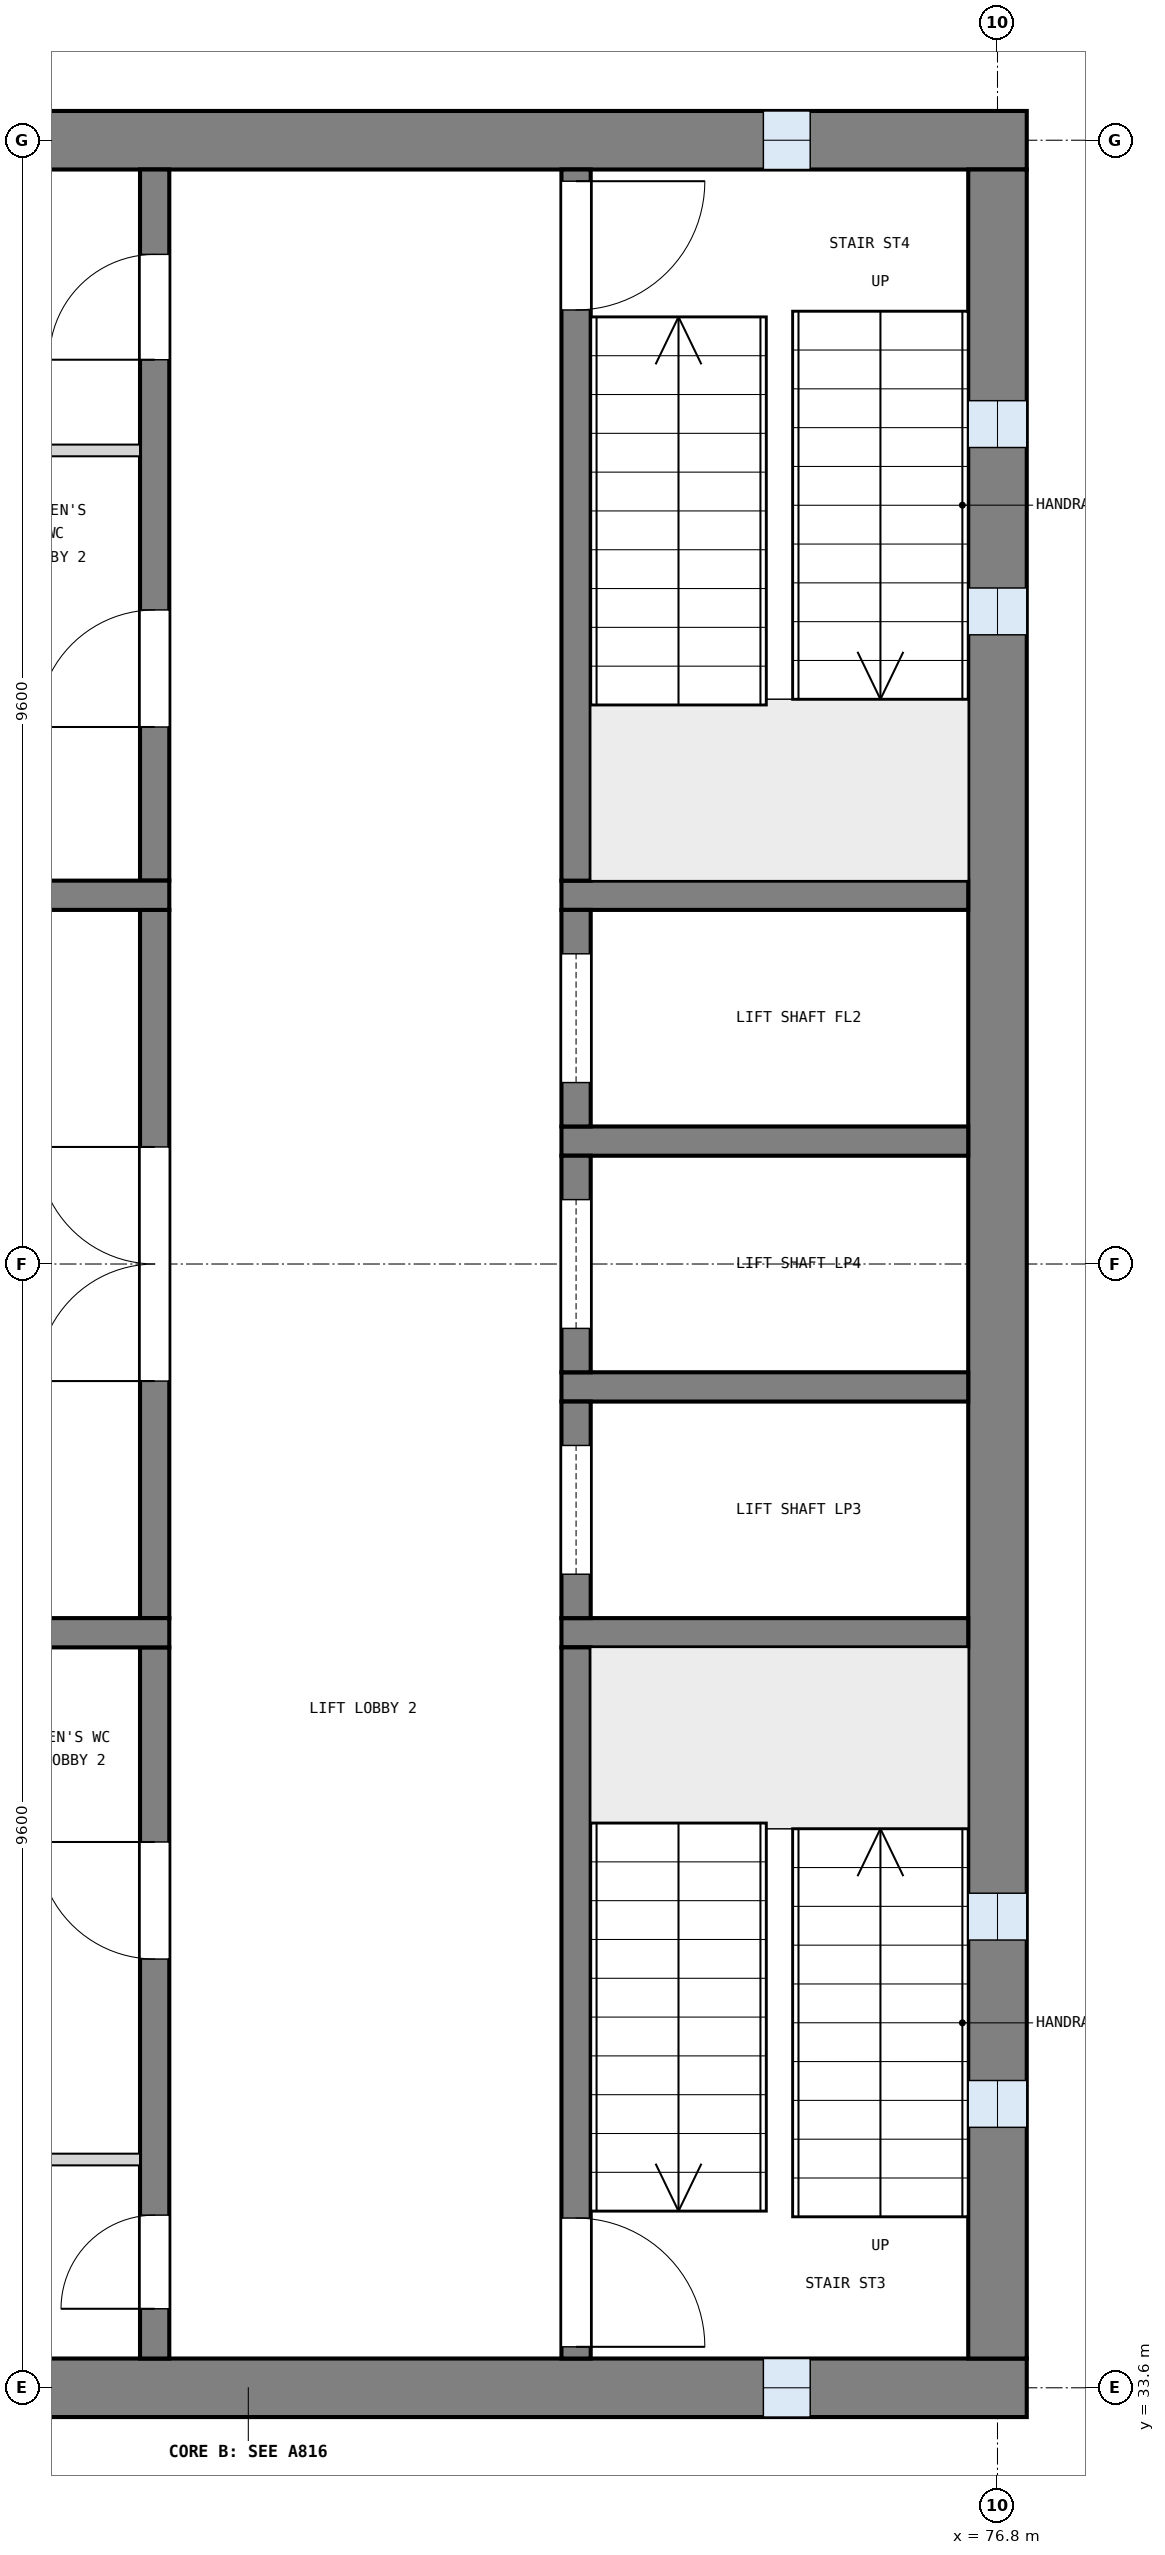
"""IFC4 building model, lengths in metres.
Left out: names, types, materials, properties, quantities, classifications, styles, units other than length and angle.
Written with IfcOpenShell. Run it as: python <this file> out.ifc"""

import sys

from ifc_helpers import new_model, si_unit, direction, frame, frame_2d, origin, place, context, subcontext, project, spatial, rectangle, extrude, element, fill, save


model = new_model("IFC4")
c1 = context("Model", 3, precision=1e-05, world=origin(), true_north=direction((0.0, 1.0)))
c2 = subcontext(c1, "Body", "Model", "MODEL_VIEW")
j1 = project(units=[si_unit("LENGTHUNIT", "METRE"), si_unit("PLANEANGLEUNIT", "RADIAN")], contexts=[c1])
p1 = place(None, origin())
s1 = spatial("IfcSite", under=j1, at=p1, CompositionType="ELEMENT")
p2 = place(p1, origin())
s2 = spatial("IfcBuilding", under=s1, at=p2, CompositionType="ELEMENT")
p3 = place(p2, frame((0.0, 0.0, 56.1)))
s3 = spatial("IfcBuildingStorey", under=s2, at=p3, CompositionType="ELEMENT", Elevation=56.1)
p4 = place(p3, frame((63.75, 52.8, 0.0), z_axis=(0.0, 0.0, 1.0), x_axis=(1.0, 0.0, 0.0)))
e1 = element("IfcWall", 1, at=p4, inside=s3, PredefinedType="SHEAR", context=c2, shape_type="SweptSolid", body=[
    extrude(rectangle(XDim=13.3, YDim=0.5, at=frame_2d((6.65, 0.0))), origin(), (0.0, 0.0, 1.0), 3.9),
])
p5 = place(p4, frame((11.05, 0.0, 1.0)))
e2 = element("IfcOpeningElement", 2, at=p5, cuts=e1, PredefinedType="OPENING", context=c2, shape_type="SweptSolid", body=[
    extrude(rectangle(XDim=0.4, YDim=2.0, at=frame_2d((0.2, 1.0))), frame((0.0, 0.26, 0.0), z_axis=(0.0, -1.0, 0.0), x_axis=(1.0, 0.0, 0.0)), (0.0, 0.0, 1.0), 0.52),
])
p6 = place(p3, frame((63.75, 33.6, 0.0), z_axis=(0.0, 0.0, 1.0), x_axis=(1.0, 0.0, 0.0)))
e3 = element("IfcWall", 3, at=p6, inside=s3, PredefinedType="SHEAR", context=c2, shape_type="SweptSolid", body=[
    extrude(rectangle(XDim=13.3, YDim=0.5, at=frame_2d((6.65, 0.0))), origin(), (0.0, 0.0, 1.0), 3.9),
])
p7 = place(p6, frame((11.05, 0.0, 1.0)))
e4 = element("IfcOpeningElement", 4, at=p7, cuts=e3, PredefinedType="OPENING", context=c2, shape_type="SweptSolid", body=[
    extrude(rectangle(XDim=0.4, YDim=2.0, at=frame_2d((0.2, 1.0))), frame((0.0, 0.26, 0.0), z_axis=(0.0, -1.0, 0.0), x_axis=(1.0, 0.0, 0.0)), (0.0, 0.0, 1.0), 0.52),
])
p8 = place(p3, frame((76.8, 33.85, 0.0), z_axis=(0.0, 0.0, 1.0), x_axis=(0.0, 1.0, 0.0)))
e5 = element("IfcWall", 5, at=p8, inside=s3, PredefinedType="SHEAR", context=c2, shape_type="SweptSolid", body=[
    extrude(rectangle(XDim=18.7, YDim=0.5, at=frame_2d((9.35, 0.0))), origin(), (0.0, 0.0, 1.0), 3.9),
])
p9 = place(p8, frame((1.975, 0.0, 1.0)))
e6 = element("IfcOpeningElement", 6, at=p9, cuts=e5, PredefinedType="OPENING", context=c2, shape_type="SweptSolid", body=[
    extrude(rectangle(XDim=0.4, YDim=2.0, at=frame_2d((0.2, 1.0))), frame((0.0, 0.26, 0.0), z_axis=(0.0, -1.0, 0.0), x_axis=(1.0, 0.0, 0.0)), (0.0, 0.0, 1.0), 0.52),
])
p10 = place(p8, frame((3.575, 0.0, 1.0)))
e7 = element("IfcOpeningElement", 7, at=p10, cuts=e5, PredefinedType="OPENING", context=c2, shape_type="SweptSolid", body=[
    extrude(rectangle(XDim=0.4, YDim=2.0, at=frame_2d((0.2, 1.0))), frame((0.0, 0.26, 0.0), z_axis=(0.0, -1.0, 0.0), x_axis=(1.0, 0.0, 0.0)), (0.0, 0.0, 1.0), 0.52),
])
p11 = place(p8, frame((14.725, 0.0, 1.0)))
e8 = element("IfcOpeningElement", 8, at=p11, cuts=e5, PredefinedType="OPENING", context=c2, shape_type="SweptSolid", body=[
    extrude(rectangle(XDim=0.4, YDim=2.0, at=frame_2d((0.2, 1.0))), frame((0.0, 0.26, 0.0), z_axis=(0.0, -1.0, 0.0), x_axis=(1.0, 0.0, 0.0)), (0.0, 0.0, 1.0), 0.52),
])
p12 = place(p8, frame((16.325, 0.0, 1.0)))
e9 = element("IfcOpeningElement", 9, at=p12, cuts=e5, PredefinedType="OPENING", context=c2, shape_type="SweptSolid", body=[
    extrude(rectangle(XDim=0.4, YDim=2.0, at=frame_2d((0.2, 1.0))), frame((0.0, 0.26, 0.0), z_axis=(0.0, -1.0, 0.0), x_axis=(1.0, 0.0, 0.0)), (0.0, 0.0, 1.0), 0.52),
])
for number, where, z_axis, x_axis in (
    (10, (76.55, 40.05, 0.0), (0.0, 0.0, 1.0), (-1.0, 0.0, 0.0)),
    (11, (76.55, 42.15, 0.0), (0.0, 0.0, 1.0), (-1.0, 0.0, 0.0)),
    (12, (76.55, 44.25, 0.0), (0.0, 0.0, 1.0), (-1.0, 0.0, 0.0)),
    (13, (76.55, 46.35, 0.0), (0.0, 0.0, 1.0), (-1.0, 0.0, 0.0)),
):
    element("IfcWall", number, at=place(p3, frame(where, z_axis=z_axis, x_axis=x_axis)), inside=s3, PredefinedType="SOLIDWALL", context=c2, shape_type="SweptSolid", body=[
        extrude(rectangle(XDim=3.475, YDim=0.25, at=frame_2d((1.738, 0.0))), origin(), (0.0, 0.0, 1.0), 3.6),
    ])
p13 = place(p3, frame((73.2, 33.85, 0.0), z_axis=(0.0, 0.0, 1.0), x_axis=(0.0, 1.0, 0.0)))
e14 = element("IfcWall", 14, at=p13, inside=s3, PredefinedType="SOLIDWALL", context=c2, shape_type="SweptSolid", body=[
    extrude(rectangle(XDim=6.075, YDim=0.25, at=frame_2d((3.038, 0.0))), origin(), (0.0, 0.0, 1.0), 3.6),
])
p14 = place(p13, frame((0.1, 0.0, 0.0)))
e15 = element("IfcOpeningElement", 15, at=p14, cuts=e14, PredefinedType="OPENING", context=c2, shape_type="SweptSolid", body=[
    extrude(rectangle(XDim=1.1, YDim=2.1, at=frame_2d((0.55, 1.05))), frame((0.0, 0.135, 0.0), z_axis=(0.0, -1.0, 0.0), x_axis=(1.0, 0.0, 0.0)), (0.0, 0.0, 1.0), 0.27),
])
p15 = place(p3, frame((73.2, 40.175, 0.0), z_axis=(0.0, 0.0, 1.0), x_axis=(0.0, 1.0, 0.0)))
e16 = element("IfcWall", 16, at=p15, inside=s3, PredefinedType="SOLIDWALL", context=c2, shape_type="SweptSolid", body=[
    extrude(rectangle(XDim=1.85, YDim=0.25, at=frame_2d((0.925, 0.0))), origin(), (0.0, 0.0, 1.0), 3.6),
])
p16 = place(p15, frame((0.375, 0.0, 0.0)))
e17 = element("IfcOpeningElement", 17, at=p16, cuts=e16, PredefinedType="OPENING", context=c2, shape_type="SweptSolid", body=[
    extrude(rectangle(XDim=1.1, YDim=2.1, at=frame_2d((0.55, 1.05))), frame((0.0, 0.135, 0.0), z_axis=(0.0, -1.0, 0.0), x_axis=(1.0, 0.0, 0.0)), (0.0, 0.0, 1.0), 0.27),
])
p17 = place(p3, frame((73.2, 42.275, 0.0), z_axis=(0.0, 0.0, 1.0), x_axis=(0.0, 1.0, 0.0)))
e18 = element("IfcWall", 18, at=p17, inside=s3, PredefinedType="SOLIDWALL", context=c2, shape_type="SweptSolid", body=[
    extrude(rectangle(XDim=1.85, YDim=0.25, at=frame_2d((0.925, 0.0))), origin(), (0.0, 0.0, 1.0), 3.6),
])
p18 = place(p17, frame((0.375, 0.0, 0.0)))
e19 = element("IfcOpeningElement", 19, at=p18, cuts=e18, PredefinedType="OPENING", context=c2, shape_type="SweptSolid", body=[
    extrude(rectangle(XDim=1.1, YDim=2.1, at=frame_2d((0.55, 1.05))), frame((0.0, 0.135, 0.0), z_axis=(0.0, -1.0, 0.0), x_axis=(1.0, 0.0, 0.0)), (0.0, 0.0, 1.0), 0.27),
])
p19 = place(p3, frame((73.2, 44.375, 0.0), z_axis=(0.0, 0.0, 1.0), x_axis=(0.0, 1.0, 0.0)))
e20 = element("IfcWall", 20, at=p19, inside=s3, PredefinedType="SOLIDWALL", context=c2, shape_type="SweptSolid", body=[
    extrude(rectangle(XDim=1.85, YDim=0.25, at=frame_2d((0.925, 0.0))), origin(), (0.0, 0.0, 1.0), 3.6),
])
p20 = place(p19, frame((0.375, 0.0, 0.0)))
e21 = element("IfcOpeningElement", 21, at=p20, cuts=e20, PredefinedType="OPENING", context=c2, shape_type="SweptSolid", body=[
    extrude(rectangle(XDim=1.1, YDim=2.1, at=frame_2d((0.55, 1.05))), frame((0.0, 0.135, 0.0), z_axis=(0.0, -1.0, 0.0), x_axis=(1.0, 0.0, 0.0)), (0.0, 0.0, 1.0), 0.27),
])
p21 = place(p3, frame((73.2, 46.475, 0.0), z_axis=(0.0, 0.0, 1.0), x_axis=(0.0, 1.0, 0.0)))
e22 = element("IfcWall", 22, at=p21, inside=s3, PredefinedType="SOLIDWALL", context=c2, shape_type="SweptSolid", body=[
    extrude(rectangle(XDim=6.075, YDim=0.25, at=frame_2d((3.038, 0.0))), origin(), (0.0, 0.0, 1.0), 3.6),
])
p22 = place(p21, frame((4.875, 0.0, 0.0)))
e23 = element("IfcOpeningElement", 23, at=p22, cuts=e22, PredefinedType="OPENING", context=c2, shape_type="SweptSolid", body=[
    extrude(rectangle(XDim=1.1, YDim=2.1, at=frame_2d((0.55, 1.05))), frame((0.0, 0.135, 0.0), z_axis=(0.0, -1.0, 0.0), x_axis=(1.0, 0.0, 0.0)), (0.0, 0.0, 1.0), 0.27),
])
p23 = place(p3, frame((69.6, 33.85, 0.0), z_axis=(0.0, 0.0, 1.0), x_axis=(0.0, 1.0, 0.0)))
e24 = element("IfcWall", 24, at=p23, inside=s3, PredefinedType="SOLIDWALL", context=c2, shape_type="SweptSolid", body=[
    extrude(rectangle(XDim=6.075, YDim=0.25, at=frame_2d((3.038, 0.0))), origin(), (0.0, 0.0, 1.0), 3.6),
])
p24 = place(p23, frame((0.425, 0.0, 0.0)))
e25 = element("IfcOpeningElement", 25, at=p24, cuts=e24, PredefinedType="OPENING", context=c2, shape_type="SweptSolid", body=[
    extrude(rectangle(XDim=0.8, YDim=2.1, at=frame_2d((0.4, 1.05))), frame((0.0, 0.135, 0.0), z_axis=(0.0, -1.0, 0.0), x_axis=(1.0, 0.0, 0.0)), (0.0, 0.0, 1.0), 0.27),
])
p25 = place(p23, frame((3.413, 0.0, 0.0)))
e26 = element("IfcOpeningElement", 26, at=p25, cuts=e24, PredefinedType="OPENING", context=c2, shape_type="SweptSolid", body=[
    extrude(rectangle(XDim=1.0, YDim=2.1, at=frame_2d((0.5, 1.05))), frame((0.0, 0.135, 0.0), z_axis=(0.0, -1.0, 0.0), x_axis=(1.0, 0.0, 0.0)), (0.0, 0.0, 1.0), 0.27),
])
p26 = place(p3, frame((69.6, 40.175, 0.0), z_axis=(0.0, 0.0, 1.0), x_axis=(0.0, 1.0, 0.0)))
e27 = element("IfcWall", 27, at=p26, inside=s3, PredefinedType="SOLIDWALL", context=c2, shape_type="SweptSolid", body=[
    extrude(rectangle(XDim=6.05, YDim=0.25, at=frame_2d((3.025, 0.0))), origin(), (0.0, 0.0, 1.0), 3.6),
])
p27 = place(p26, frame((2.025, 0.0, 0.0)))
e28 = element("IfcOpeningElement", 28, at=p27, cuts=e27, PredefinedType="OPENING", context=c2, shape_type="SweptSolid", body=[
    extrude(rectangle(XDim=2.0, YDim=2.1, at=frame_2d((1.0, 1.05))), frame((0.0, 0.135, 0.0), z_axis=(0.0, -1.0, 0.0), x_axis=(1.0, 0.0, 0.0)), (0.0, 0.0, 1.0), 0.27),
])
p28 = place(p3, frame((69.6, 46.475, 0.0), z_axis=(0.0, 0.0, 1.0), x_axis=(0.0, 1.0, 0.0)))
e29 = element("IfcWall", 29, at=p28, inside=s3, PredefinedType="SOLIDWALL", context=c2, shape_type="SweptSolid", body=[
    extrude(rectangle(XDim=6.075, YDim=0.25, at=frame_2d((3.038, 0.0))), origin(), (0.0, 0.0, 1.0), 3.6),
])
p29 = place(p28, frame((1.312, 0.0, 0.0)))
e30 = element("IfcOpeningElement", 30, at=p29, cuts=e29, PredefinedType="OPENING", context=c2, shape_type="SweptSolid", body=[
    extrude(rectangle(XDim=1.0, YDim=2.1, at=frame_2d((0.5, 1.05))), frame((0.0, 0.135, 0.0), z_axis=(0.0, -1.0, 0.0), x_axis=(1.0, 0.0, 0.0)), (0.0, 0.0, 1.0), 0.27),
])
p30 = place(p28, frame((4.45, 0.0, 0.0)))
e31 = element("IfcOpeningElement", 31, at=p30, cuts=e29, PredefinedType="OPENING", context=c2, shape_type="SweptSolid", body=[
    extrude(rectangle(XDim=0.9, YDim=2.1, at=frame_2d((0.45, 1.05))), frame((0.0, 0.135, 0.0), z_axis=(0.0, -1.0, 0.0), x_axis=(1.0, 0.0, 0.0)), (0.0, 0.0, 1.0), 0.27),
])
for number, where, z_axis, x_axis in (
    (32, (69.725, 40.05, 0.0), (0.0, 0.0, 1.0), (-1.0, 0.0, 0.0)),
    (33, (69.725, 46.35, 0.0), (0.0, 0.0, 1.0), (-1.0, 0.0, 0.0)),
):
    element("IfcWall", number, at=place(p3, frame(where, z_axis=z_axis, x_axis=x_axis)), inside=s3, PredefinedType="SOLIDWALL", context=c2, shape_type="SweptSolid", body=[
        extrude(rectangle(XDim=5.475, YDim=0.25, at=frame_2d((2.738, 0.0))), origin(), (0.0, 0.0, 1.0), 3.6),
    ])
for number, where, z_axis, x_axis in (
    (34, (69.475, 35.55, 0.0), (0.0, 0.0, 1.0), (-1.0, 0.0, 0.0)),
    (35, (69.475, 50.15, 0.0), (0.0, 0.0, 1.0), (-1.0, 0.0, 0.0)),
):
    element("IfcWall", number, at=place(p3, frame(where, z_axis=z_axis, x_axis=x_axis)), inside=s3, PredefinedType="PARTITIONING", context=c2, shape_type="SweptSolid", body=[
        extrude(rectangle(XDim=5.225, YDim=0.1, at=frame_2d((2.613, 0.0))), origin(), (0.0, 0.0, 1.0), 3.6),
    ])
p31 = place(p9, origin())
e36 = element("IfcWindow", 36, at=p31, inside=s3, PartitioningType="SINGLE_PANEL", PredefinedType="WINDOW", context=c2, shape_type="SweptSolid", body=[
    extrude(rectangle(XDim=0.4, YDim=2.0, at=frame_2d((0.2, 1.0))), frame((0.0, 0.03, 0.0), z_axis=(0.0, -1.0, 0.0), x_axis=(1.0, 0.0, 0.0)), (0.0, 0.0, 1.0), 0.06),
])
fill(e6, e36)
p32 = place(p10, origin())
e37 = element("IfcWindow", 37, at=p32, inside=s3, PartitioningType="SINGLE_PANEL", PredefinedType="WINDOW", context=c2, shape_type="SweptSolid", body=[
    extrude(rectangle(XDim=0.4, YDim=2.0, at=frame_2d((0.2, 1.0))), frame((0.0, 0.03, 0.0), z_axis=(0.0, -1.0, 0.0), x_axis=(1.0, 0.0, 0.0)), (0.0, 0.0, 1.0), 0.06),
])
fill(e7, e37)
p33 = place(p11, origin())
e38 = element("IfcWindow", 38, at=p33, inside=s3, PartitioningType="SINGLE_PANEL", PredefinedType="WINDOW", context=c2, shape_type="SweptSolid", body=[
    extrude(rectangle(XDim=0.4, YDim=2.0, at=frame_2d((0.2, 1.0))), frame((0.0, 0.03, 0.0), z_axis=(0.0, -1.0, 0.0), x_axis=(1.0, 0.0, 0.0)), (0.0, 0.0, 1.0), 0.06),
])
fill(e8, e38)
p34 = place(p12, origin())
e39 = element("IfcWindow", 39, at=p34, inside=s3, PartitioningType="SINGLE_PANEL", PredefinedType="WINDOW", context=c2, shape_type="SweptSolid", body=[
    extrude(rectangle(XDim=0.4, YDim=2.0, at=frame_2d((0.2, 1.0))), frame((0.0, 0.03, 0.0), z_axis=(0.0, -1.0, 0.0), x_axis=(1.0, 0.0, 0.0)), (0.0, 0.0, 1.0), 0.06),
])
fill(e9, e39)
p35 = place(p7, origin())
e40 = element("IfcWindow", 40, at=p35, inside=s3, PartitioningType="SINGLE_PANEL", PredefinedType="WINDOW", context=c2, shape_type="SweptSolid", body=[
    extrude(rectangle(XDim=0.4, YDim=2.0, at=frame_2d((0.2, 1.0))), frame((0.0, 0.03, 0.0), z_axis=(0.0, -1.0, 0.0), x_axis=(1.0, 0.0, 0.0)), (0.0, 0.0, 1.0), 0.06),
])
fill(e4, e40)
p36 = place(p5, origin())
e41 = element("IfcWindow", 41, at=p36, inside=s3, PartitioningType="SINGLE_PANEL", PredefinedType="WINDOW", context=c2, shape_type="SweptSolid", body=[
    extrude(rectangle(XDim=0.4, YDim=2.0, at=frame_2d((0.2, 1.0))), frame((0.0, 0.03, 0.0), z_axis=(0.0, -1.0, 0.0), x_axis=(1.0, 0.0, 0.0)), (0.0, 0.0, 1.0), 0.06),
])
fill(e2, e41)
p37 = place(p14, frame((1.1, 0.0, 0.0), z_axis=(0.0, 0.0, 1.0), x_axis=(-1.0, 0.0, 0.0)))
e42 = element("IfcDoor", 42, at=p37, inside=s3, OperationType="SINGLE_SWING_RIGHT", PredefinedType="DOOR", context=c2, shape_type="SweptSolid", body=[
    extrude(rectangle(XDim=1.1, YDim=2.1, at=frame_2d((0.55, 1.05))), frame((0.0, 0.025, 0.0), z_axis=(0.0, -1.0, 0.0), x_axis=(1.0, 0.0, 0.0)), (0.0, 0.0, 1.0), 0.05),
])
fill(e15, e42)
p38 = place(p22, frame((1.1, 0.0, 0.0), z_axis=(0.0, 0.0, 1.0), x_axis=(-1.0, 0.0, 0.0)))
e43 = element("IfcDoor", 43, at=p38, inside=s3, OperationType="SINGLE_SWING_LEFT", PredefinedType="DOOR", context=c2, shape_type="SweptSolid", body=[
    extrude(rectangle(XDim=1.1, YDim=2.1, at=frame_2d((0.55, 1.05))), frame((0.0, 0.025, 0.0), z_axis=(0.0, -1.0, 0.0), x_axis=(1.0, 0.0, 0.0)), (0.0, 0.0, 1.0), 0.05),
])
fill(e23, e43)
p39 = place(p16, origin())
e44 = element("IfcDoor", 44, at=p39, inside=s3, OperationType="SLIDING_TO_LEFT", PredefinedType="DOOR", context=c2, shape_type="SweptSolid", body=[
    extrude(rectangle(XDim=1.1, YDim=2.1, at=frame_2d((0.55, 1.05))), frame((0.0, 0.025, 0.0), z_axis=(0.0, -1.0, 0.0), x_axis=(1.0, 0.0, 0.0)), (0.0, 0.0, 1.0), 0.05),
])
fill(e17, e44)
p40 = place(p18, origin())
e45 = element("IfcDoor", 45, at=p40, inside=s3, OperationType="SLIDING_TO_LEFT", PredefinedType="DOOR", context=c2, shape_type="SweptSolid", body=[
    extrude(rectangle(XDim=1.1, YDim=2.1, at=frame_2d((0.55, 1.05))), frame((0.0, 0.025, 0.0), z_axis=(0.0, -1.0, 0.0), x_axis=(1.0, 0.0, 0.0)), (0.0, 0.0, 1.0), 0.05),
])
fill(e19, e45)
p41 = place(p20, origin())
e46 = element("IfcDoor", 46, at=p41, inside=s3, OperationType="SLIDING_TO_LEFT", PredefinedType="DOOR", context=c2, shape_type="SweptSolid", body=[
    extrude(rectangle(XDim=1.1, YDim=2.1, at=frame_2d((0.55, 1.05))), frame((0.0, 0.025, 0.0), z_axis=(0.0, -1.0, 0.0), x_axis=(1.0, 0.0, 0.0)), (0.0, 0.0, 1.0), 0.05),
])
fill(e21, e46)
p42 = place(p27, origin())
e47 = element("IfcDoor", 47, at=p42, inside=s3, OperationType="DOUBLE_DOOR_SINGLE_SWING", PredefinedType="DOOR", context=c2, shape_type="SweptSolid", body=[
    extrude(rectangle(XDim=2.0, YDim=2.1, at=frame_2d((1.0, 1.05))), frame((0.0, 0.025, 0.0), z_axis=(0.0, -1.0, 0.0), x_axis=(1.0, 0.0, 0.0)), (0.0, 0.0, 1.0), 0.05),
])
fill(e28, e47)
p43 = place(p24, origin())
e48 = element("IfcDoor", 48, at=p43, inside=s3, OperationType="SINGLE_SWING_LEFT", PredefinedType="DOOR", context=c2, shape_type="SweptSolid", body=[
    extrude(rectangle(XDim=0.8, YDim=2.1, at=frame_2d((0.4, 1.05))), frame((0.0, 0.025, 0.0), z_axis=(0.0, -1.0, 0.0), x_axis=(1.0, 0.0, 0.0)), (0.0, 0.0, 1.0), 0.05),
])
fill(e25, e48)
p44 = place(p25, origin())
e49 = element("IfcDoor", 49, at=p44, inside=s3, OperationType="SINGLE_SWING_RIGHT", PredefinedType="DOOR", context=c2, shape_type="SweptSolid", body=[
    extrude(rectangle(XDim=1.0, YDim=2.1, at=frame_2d((0.5, 1.05))), frame((0.0, 0.025, 0.0), z_axis=(0.0, -1.0, 0.0), x_axis=(1.0, 0.0, 0.0)), (0.0, 0.0, 1.0), 0.05),
])
fill(e26, e49)
p45 = place(p29, origin())
e50 = element("IfcDoor", 50, at=p45, inside=s3, OperationType="SINGLE_SWING_LEFT", PredefinedType="DOOR", context=c2, shape_type="SweptSolid", body=[
    extrude(rectangle(XDim=1.0, YDim=2.1, at=frame_2d((0.5, 1.05))), frame((0.0, 0.025, 0.0), z_axis=(0.0, -1.0, 0.0), x_axis=(1.0, 0.0, 0.0)), (0.0, 0.0, 1.0), 0.05),
])
fill(e30, e50)
p46 = place(p30, origin())
e51 = element("IfcDoor", 51, at=p46, inside=s3, OperationType="SINGLE_SWING_LEFT", PredefinedType="DOOR", context=c2, shape_type="SweptSolid", body=[
    extrude(rectangle(XDim=0.9, YDim=2.1, at=frame_2d((0.45, 1.05))), frame((0.0, 0.025, 0.0), z_axis=(0.0, -1.0, 0.0), x_axis=(1.0, 0.0, 0.0)), (0.0, 0.0, 1.0), 0.05),
])
fill(e31, e51)
save(model, sys.argv[1])
